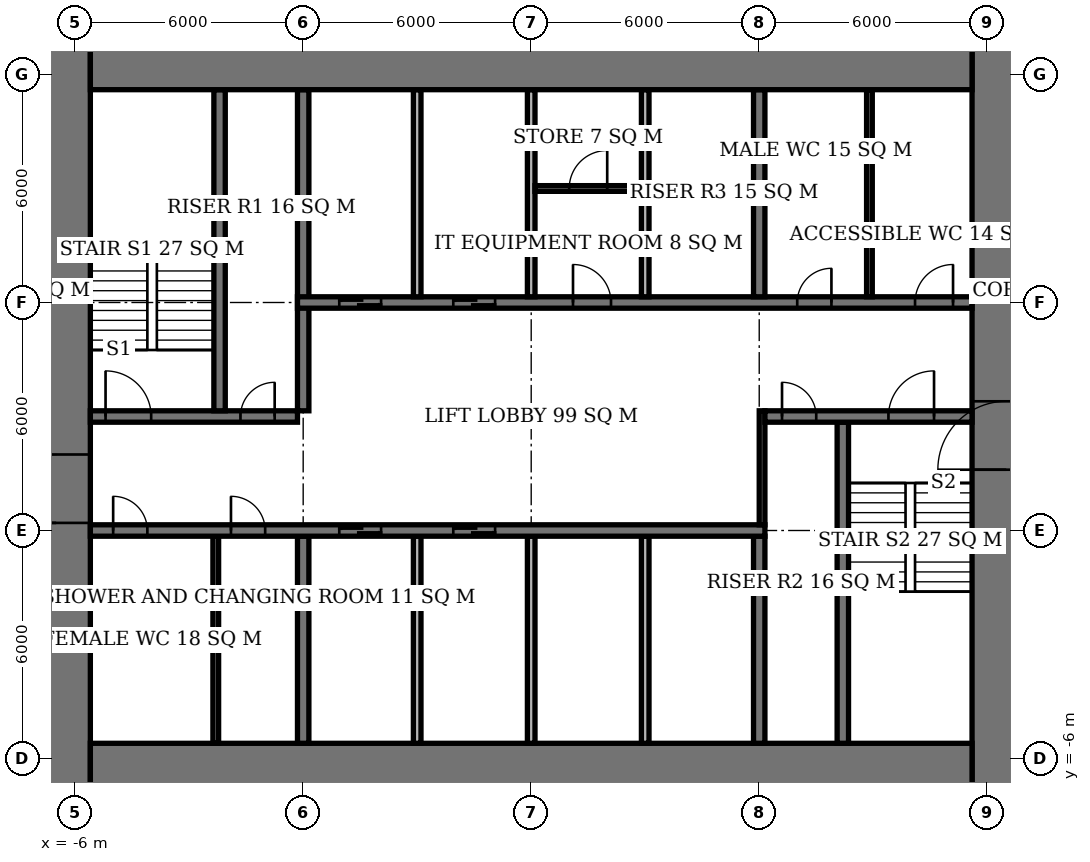
"""IFC4 building model, lengths in metres.
Left out: names, types, materials, properties, quantities, classifications, styles, units other than length and angle.
Written with IfcOpenShell. Run it as: python <this file> out.ifc"""

import sys

from ifc_helpers import new_model, si_unit, direction, frame, frame_2d, origin, place, context, subcontext, project, spatial, rectangle, extrude, element, fill, save


model = new_model("IFC4")
c1 = context("Model", 3, precision=1e-05, world=origin(), true_north=direction((0.0, 1.0)))
c2 = subcontext(c1, "Body", "Model", "MODEL_VIEW")
j1 = project(units=[si_unit("LENGTHUNIT", "METRE"), si_unit("PLANEANGLEUNIT", "RADIAN")], contexts=[c1])
p1 = place(None, origin())
s1 = spatial("IfcSite", under=j1, at=p1, CompositionType="ELEMENT")
p2 = place(p1, origin())
s2 = spatial("IfcBuilding", under=s1, at=p2, CompositionType="ELEMENT")
p3 = place(p2, frame((0.0, 0.0, 152.3)))
s3 = spatial("IfcBuildingStorey", under=s2, at=p3, CompositionType="ELEMENT", Elevation=152.3)
for number, where, z_axis, x_axis in (
    (1, (-5.6, -6.6, 0.0), (0.0, 0.0, 1.0), (1.0, 0.0, 0.0)),
    (2, (-5.6, 12.6, 0.0), (0.0, 0.0, 1.0), (1.0, 0.0, 0.0)),
):
    element("IfcWall", number, at=place(p3, frame(where, z_axis=z_axis, x_axis=x_axis)), inside=s3, PredefinedType="SHEAR", context=c2, shape_type="SweptSolid", body=[
        extrude(rectangle(XDim=23.2, YDim=2.0, at=frame_2d((11.6, 0.0))), origin(), (0.0, 0.0, 1.0), 3.9),
    ])
p4 = place(p3, frame((-6.5, -7.6, 0.0), z_axis=(0.0, 0.0, 1.0), x_axis=(0.0, 1.0, 0.0)))
e3 = element("IfcWall", 3, at=p4, inside=s3, PredefinedType="SHEAR", context=c2, shape_type="SweptSolid", body=[
    extrude(rectangle(XDim=21.2, YDim=1.8, at=frame_2d((10.6, 0.0))), origin(), (0.0, 0.0, 1.0), 3.9),
])
p5 = place(p4, frame((7.8, 0.0, 0.0)))
e4 = element("IfcOpeningElement", 4, at=p5, cuts=e3, PredefinedType="OPENING", context=c2, shape_type="SweptSolid", body=[
    extrude(rectangle(XDim=1.8, YDim=2.4, at=frame_2d((0.9, 1.2))), frame((0.0, 0.91, 0.0), z_axis=(0.0, -1.0, 0.0), x_axis=(1.0, 0.0, 0.0)), (0.0, 0.0, 1.0), 1.82),
])
p6 = place(p3, frame((18.5, -7.6, 0.0), z_axis=(0.0, 0.0, 1.0), x_axis=(0.0, 1.0, 0.0)))
e5 = element("IfcWall", 5, at=p6, inside=s3, PredefinedType="SHEAR", context=c2, shape_type="SweptSolid", body=[
    extrude(rectangle(XDim=21.2, YDim=1.8, at=frame_2d((10.6, 0.0))), origin(), (0.0, 0.0, 1.0), 3.9),
])
p7 = place(p6, frame((9.2, 0.0, 0.0)))
e6 = element("IfcOpeningElement", 6, at=p7, cuts=e5, PredefinedType="OPENING", context=c2, shape_type="SweptSolid", body=[
    extrude(rectangle(XDim=1.8, YDim=2.4, at=frame_2d((0.9, 1.2))), frame((0.0, 0.91, 0.0), z_axis=(0.0, -1.0, 0.0), x_axis=(1.0, 0.0, 0.0)), (0.0, 0.0, 1.0), 1.82),
])
p8 = place(p3, frame((-5.6, 0.0, 0.0), z_axis=(0.0, 0.0, 1.0), x_axis=(1.0, 0.0, 0.0)))
e7 = element("IfcWall", 7, at=p8, inside=s3, PredefinedType="SHEAR", context=c2, shape_type="SweptSolid", body=[
    extrude(rectangle(XDim=17.75, YDim=0.3, at=frame_2d((8.875, 0.0))), origin(), (0.0, 0.0, 1.0), 3.9),
])
p9 = place(p8, frame((0.6, 0.0, 0.0)))
e8 = element("IfcOpeningElement", 8, at=p9, cuts=e7, PredefinedType="OPENING", context=c2, shape_type="SweptSolid", body=[
    extrude(rectangle(XDim=0.9, YDim=2.1, at=frame_2d((0.45, 1.05))), frame((0.0, 0.16, 0.0), z_axis=(0.0, -1.0, 0.0), x_axis=(1.0, 0.0, 0.0)), (0.0, 0.0, 1.0), 0.32),
])
p10 = place(p8, frame((3.7, 0.0, 0.0)))
e9 = element("IfcOpeningElement", 9, at=p10, cuts=e7, PredefinedType="OPENING", context=c2, shape_type="SweptSolid", body=[
    extrude(rectangle(XDim=0.9, YDim=2.1, at=frame_2d((0.45, 1.05))), frame((0.0, 0.16, 0.0), z_axis=(0.0, -1.0, 0.0), x_axis=(1.0, 0.0, 0.0)), (0.0, 0.0, 1.0), 0.32),
])
p11 = place(p8, frame((6.55, 0.0, 0.0)))
e10 = element("IfcOpeningElement", 10, at=p11, cuts=e7, PredefinedType="OPENING", context=c2, shape_type="SweptSolid", body=[
    extrude(rectangle(XDim=1.1, YDim=2.1, at=frame_2d((0.55, 1.05))), frame((0.0, 0.16, 0.0), z_axis=(0.0, -1.0, 0.0), x_axis=(1.0, 0.0, 0.0)), (0.0, 0.0, 1.0), 0.32),
])
p12 = place(p8, frame((9.55, 0.0, 0.0)))
e11 = element("IfcOpeningElement", 11, at=p12, cuts=e7, PredefinedType="OPENING", context=c2, shape_type="SweptSolid", body=[
    extrude(rectangle(XDim=1.1, YDim=2.1, at=frame_2d((0.55, 1.05))), frame((0.0, 0.16, 0.0), z_axis=(0.0, -1.0, 0.0), x_axis=(1.0, 0.0, 0.0)), (0.0, 0.0, 1.0), 0.32),
])
p13 = place(p3, frame((-5.6, 3.0, 0.0), z_axis=(0.0, 0.0, 1.0), x_axis=(1.0, 0.0, 0.0)))
e12 = element("IfcWall", 12, at=p13, inside=s3, PredefinedType="SHEAR", context=c2, shape_type="SweptSolid", body=[
    extrude(rectangle(XDim=5.45, YDim=0.3, at=frame_2d((2.725, 0.0))), origin(), (0.0, 0.0, 1.0), 3.9),
])
p14 = place(p13, frame((0.4, 0.0, 0.0)))
e13 = element("IfcOpeningElement", 13, at=p14, cuts=e12, PredefinedType="OPENING", context=c2, shape_type="SweptSolid", body=[
    extrude(rectangle(XDim=1.2, YDim=2.1, at=frame_2d((0.6, 1.05))), frame((0.0, 0.16, 0.0), z_axis=(0.0, -1.0, 0.0), x_axis=(1.0, 0.0, 0.0)), (0.0, 0.0, 1.0), 0.32),
])
p15 = place(p13, frame((3.95, 0.0, 0.0)))
e14 = element("IfcOpeningElement", 14, at=p15, cuts=e12, PredefinedType="OPENING", context=c2, shape_type="SweptSolid", body=[
    extrude(rectangle(XDim=0.9, YDim=2.1, at=frame_2d((0.45, 1.05))), frame((0.0, 0.16, 0.0), z_axis=(0.0, -1.0, 0.0), x_axis=(1.0, 0.0, 0.0)), (0.0, 0.0, 1.0), 0.32),
])
p16 = place(p3, frame((12.15, 3.0, 0.0), z_axis=(0.0, 0.0, 1.0), x_axis=(1.0, 0.0, 0.0)))
e15 = element("IfcWall", 15, at=p16, inside=s3, PredefinedType="SHEAR", context=c2, shape_type="SweptSolid", body=[
    extrude(rectangle(XDim=5.45, YDim=0.3, at=frame_2d((2.725, 0.0))), origin(), (0.0, 0.0, 1.0), 3.9),
])
p17 = place(p16, frame((3.25, 0.0, 0.0)))
e16 = element("IfcOpeningElement", 16, at=p17, cuts=e15, PredefinedType="OPENING", context=c2, shape_type="SweptSolid", body=[
    extrude(rectangle(XDim=1.2, YDim=2.1, at=frame_2d((0.6, 1.05))), frame((0.0, 0.16, 0.0), z_axis=(0.0, -1.0, 0.0), x_axis=(1.0, 0.0, 0.0)), (0.0, 0.0, 1.0), 0.32),
])
p18 = place(p16, frame((0.45, 0.0, 0.0)))
e17 = element("IfcOpeningElement", 17, at=p18, cuts=e15, PredefinedType="OPENING", context=c2, shape_type="SweptSolid", body=[
    extrude(rectangle(XDim=0.9, YDim=2.1, at=frame_2d((0.45, 1.05))), frame((0.0, 0.16, 0.0), z_axis=(0.0, -1.0, 0.0), x_axis=(1.0, 0.0, 0.0)), (0.0, 0.0, 1.0), 0.32),
])
p19 = place(p3, frame((-0.15, 6.0, 0.0), z_axis=(0.0, 0.0, 1.0), x_axis=(1.0, 0.0, 0.0)))
e18 = element("IfcWall", 18, at=p19, inside=s3, PredefinedType="SHEAR", context=c2, shape_type="SweptSolid", body=[
    extrude(rectangle(XDim=17.75, YDim=0.3, at=frame_2d((8.875, 0.0))), origin(), (0.0, 0.0, 1.0), 3.9),
])
p20 = place(p19, frame((13.15, 0.0, 0.0)))
e19 = element("IfcOpeningElement", 19, at=p20, cuts=e18, PredefinedType="OPENING", context=c2, shape_type="SweptSolid", body=[
    extrude(rectangle(XDim=0.9, YDim=2.1, at=frame_2d((0.45, 1.05))), frame((0.0, 0.16, 0.0), z_axis=(0.0, -1.0, 0.0), x_axis=(1.0, 0.0, 0.0)), (0.0, 0.0, 1.0), 0.32),
])
p21 = place(p19, frame((16.25, 0.0, 0.0)))
e20 = element("IfcOpeningElement", 20, at=p21, cuts=e18, PredefinedType="OPENING", context=c2, shape_type="SweptSolid", body=[
    extrude(rectangle(XDim=1.0, YDim=2.1, at=frame_2d((0.5, 1.05))), frame((0.0, 0.16, 0.0), z_axis=(0.0, -1.0, 0.0), x_axis=(1.0, 0.0, 0.0)), (0.0, 0.0, 1.0), 0.32),
])
p22 = place(p19, frame((7.25, 0.0, 0.0)))
e21 = element("IfcOpeningElement", 21, at=p22, cuts=e18, PredefinedType="OPENING", context=c2, shape_type="SweptSolid", body=[
    extrude(rectangle(XDim=1.0, YDim=2.1, at=frame_2d((0.5, 1.05))), frame((0.0, 0.16, 0.0), z_axis=(0.0, -1.0, 0.0), x_axis=(1.0, 0.0, 0.0)), (0.0, 0.0, 1.0), 0.32),
])
p23 = place(p19, frame((1.1, 0.0, 0.0)))
e22 = element("IfcOpeningElement", 22, at=p23, cuts=e18, PredefinedType="OPENING", context=c2, shape_type="SweptSolid", body=[
    extrude(rectangle(XDim=1.1, YDim=2.1, at=frame_2d((0.55, 1.05))), frame((0.0, 0.16, 0.0), z_axis=(0.0, -1.0, 0.0), x_axis=(1.0, 0.0, 0.0)), (0.0, 0.0, 1.0), 0.32),
])
p24 = place(p19, frame((4.1, 0.0, 0.0)))
e23 = element("IfcOpeningElement", 23, at=p24, cuts=e18, PredefinedType="OPENING", context=c2, shape_type="SweptSolid", body=[
    extrude(rectangle(XDim=1.1, YDim=2.1, at=frame_2d((0.55, 1.05))), frame((0.0, 0.16, 0.0), z_axis=(0.0, -1.0, 0.0), x_axis=(1.0, 0.0, 0.0)), (0.0, 0.0, 1.0), 0.32),
])
p25 = place(p3, frame((0.0, -5.6, 0.0), z_axis=(0.0, 0.0, 1.0), x_axis=(0.0, 1.0, 0.0)))
e24 = element("IfcWall", 24, at=p25, inside=s3, PredefinedType="SHEAR", context=c2, shape_type="SweptSolid", body=[
    extrude(rectangle(XDim=5.45, YDim=0.3, at=frame_2d((2.725, 0.0))), origin(), (0.0, 0.0, 1.0), 3.9),
])
p26 = place(p3, frame((0.0, 3.15, 0.0), z_axis=(0.0, 0.0, 1.0), x_axis=(0.0, 1.0, 0.0)))
e25 = element("IfcWall", 25, at=p26, inside=s3, PredefinedType="SHEAR", context=c2, shape_type="SweptSolid", body=[
    extrude(rectangle(XDim=8.45, YDim=0.3, at=frame_2d((4.225, 0.0))), origin(), (0.0, 0.0, 1.0), 3.9),
])
for number, where, z_axis, x_axis in (
    (26, (12.0, -5.6, 0.0), (0.0, 0.0, 1.0), (0.0, 1.0, 0.0)),
    (27, (12.0, 6.15, 0.0), (0.0, 0.0, 1.0), (0.0, 1.0, 0.0)),
):
    element("IfcWall", number, at=place(p3, frame(where, z_axis=z_axis, x_axis=x_axis)), inside=s3, PredefinedType="SHEAR", context=c2, shape_type="SweptSolid", body=[
        extrude(rectangle(XDim=5.45, YDim=0.3, at=frame_2d((2.725, 0.0))), origin(), (0.0, 0.0, 1.0), 3.9),
    ])
for number, where, z_axis, x_axis in (
    (28, (-2.2, 3.15, 0.0), (0.0, 0.0, 1.0), (0.0, 1.0, 0.0)),
    (29, (14.2, -5.6, 0.0), (0.0, 0.0, 1.0), (0.0, 1.0, 0.0)),
):
    element("IfcWall", number, at=place(p3, frame(where, z_axis=z_axis, x_axis=x_axis)), inside=s3, PredefinedType="SHEAR", context=c2, shape_type="SweptSolid", body=[
        extrude(rectangle(XDim=8.45, YDim=0.3, at=frame_2d((4.225, 0.0))), origin(), (0.0, 0.0, 1.0), 3.9),
    ])
for number, where, z_axis, x_axis in (
    (30, (3.0, 6.15, 0.0), (0.0, 0.0, 1.0), (0.0, 1.0, 0.0)),
    (31, (6.0, 6.15, 0.0), (0.0, 0.0, 1.0), (0.0, 1.0, 0.0)),
    (32, (9.0, 6.15, 0.0), (0.0, 0.0, 1.0), (0.0, 1.0, 0.0)),
    (33, (3.0, -5.6, 0.0), (0.0, 0.0, 1.0), (0.0, 1.0, 0.0)),
    (34, (6.0, -5.6, 0.0), (0.0, 0.0, 1.0), (0.0, 1.0, 0.0)),
    (35, (9.0, -5.6, 0.0), (0.0, 0.0, 1.0), (0.0, 1.0, 0.0)),
):
    element("IfcWall", number, at=place(p3, frame(where, z_axis=z_axis, x_axis=x_axis)), inside=s3, PredefinedType="SOLIDWALL", context=c2, shape_type="SweptSolid", body=[
        extrude(rectangle(XDim=5.45, YDim=0.2, at=frame_2d((2.725, 0.0))), origin(), (0.0, 0.0, 1.0), 3.9),
    ])
for number, where, z_axis, x_axis in (
    (36, (-2.3, -5.6, 0.0), (0.0, 0.0, 1.0), (0.0, 1.0, 0.0)),
    (37, (14.9, 6.15, 0.0), (0.0, 0.0, 1.0), (0.0, 1.0, 0.0)),
):
    element("IfcWall", number, at=place(p3, frame(where, z_axis=z_axis, x_axis=x_axis)), inside=s3, PredefinedType="PLUMBINGWALL", context=c2, shape_type="SweptSolid", body=[
        extrude(rectangle(XDim=5.45, YDim=0.15, at=frame_2d((2.725, 0.0))), origin(), (0.0, 0.0, 1.0), 3.65),
    ])
p27 = place(p3, frame((6.1, 9.0, 0.0), z_axis=(0.0, 0.0, 1.0), x_axis=(1.0, 0.0, 0.0)))
e38 = element("IfcWall", 38, at=p27, inside=s3, PredefinedType="PARTITIONING", context=c2, shape_type="SweptSolid", body=[
    extrude(rectangle(XDim=2.8, YDim=0.15, at=frame_2d((1.4, 0.0))), origin(), (0.0, 0.0, 1.0), 3.65),
])
p28 = place(p27, frame((0.9, 0.0, 0.0)))
e39 = element("IfcOpeningElement", 39, at=p28, cuts=e38, PredefinedType="OPENING", context=c2, shape_type="SweptSolid", body=[
    extrude(rectangle(XDim=1.0, YDim=2.1, at=frame_2d((0.5, 1.05))), frame((0.0, 0.085, 0.0), z_axis=(0.0, -1.0, 0.0), x_axis=(1.0, 0.0, 0.0)), (0.0, 0.0, 1.0), 0.17),
])
p29 = place(p3, frame((12.075, 0.15, 0.0), z_axis=(0.0, 0.0, 1.0), x_axis=(0.0, 1.0, 0.0)))
e40 = element("IfcWall", 40, at=p29, inside=s3, PredefinedType="PARTITIONING", context=c2, shape_type="SweptSolid", body=[
    extrude(rectangle(XDim=3.0, YDim=0.15, at=frame_2d((1.5, 0.0))), origin(), (0.0, 0.0, 1.0), 3.65),
])
p30 = place(p5, origin())
e41 = element("IfcDoor", 41, at=p30, inside=s3, OperationType="DOUBLE_DOOR_SINGLE_SWING", PredefinedType="DOOR", context=c2, shape_type="SweptSolid", body=[
    extrude(rectangle(XDim=1.8, YDim=2.4, at=frame_2d((0.9, 1.2))), frame((0.0, 0.025, 0.0), z_axis=(0.0, -1.0, 0.0), x_axis=(1.0, 0.0, 0.0)), (0.0, 0.0, 1.0), 0.05),
])
fill(e4, e41)
p31 = place(p7, origin())
e42 = element("IfcDoor", 42, at=p31, inside=s3, OperationType="DOUBLE_DOOR_SINGLE_SWING", PredefinedType="DOOR", context=c2, shape_type="SweptSolid", body=[
    extrude(rectangle(XDim=1.8, YDim=2.4, at=frame_2d((0.9, 1.2))), frame((0.0, 0.025, 0.0), z_axis=(0.0, -1.0, 0.0), x_axis=(1.0, 0.0, 0.0)), (0.0, 0.0, 1.0), 0.05),
])
fill(e6, e42)
p32 = place(p14, origin())
e43 = element("IfcDoor", 43, at=p32, inside=s3, OperationType="SINGLE_SWING_LEFT", PredefinedType="DOOR", context=c2, shape_type="SweptSolid", body=[
    extrude(rectangle(XDim=1.2, YDim=2.1, at=frame_2d((0.6, 1.05))), frame((0.0, 0.025, 0.0), z_axis=(0.0, -1.0, 0.0), x_axis=(1.0, 0.0, 0.0)), (0.0, 0.0, 1.0), 0.05),
])
fill(e13, e43)
p33 = place(p15, origin())
e44 = element("IfcDoor", 44, at=p33, inside=s3, OperationType="SINGLE_SWING_RIGHT", PredefinedType="DOOR", context=c2, shape_type="SweptSolid", body=[
    extrude(rectangle(XDim=0.9, YDim=2.1, at=frame_2d((0.45, 1.05))), frame((0.0, 0.025, 0.0), z_axis=(0.0, -1.0, 0.0), x_axis=(1.0, 0.0, 0.0)), (0.0, 0.0, 1.0), 0.05),
])
fill(e14, e44)
p34 = place(p17, origin())
e45 = element("IfcDoor", 45, at=p34, inside=s3, OperationType="SINGLE_SWING_RIGHT", PredefinedType="DOOR", context=c2, shape_type="SweptSolid", body=[
    extrude(rectangle(XDim=1.2, YDim=2.1, at=frame_2d((0.6, 1.05))), frame((0.0, 0.025, 0.0), z_axis=(0.0, -1.0, 0.0), x_axis=(1.0, 0.0, 0.0)), (0.0, 0.0, 1.0), 0.05),
])
fill(e16, e45)
p35 = place(p18, origin())
e46 = element("IfcDoor", 46, at=p35, inside=s3, OperationType="SINGLE_SWING_LEFT", PredefinedType="DOOR", context=c2, shape_type="SweptSolid", body=[
    extrude(rectangle(XDim=0.9, YDim=2.1, at=frame_2d((0.45, 1.05))), frame((0.0, 0.025, 0.0), z_axis=(0.0, -1.0, 0.0), x_axis=(1.0, 0.0, 0.0)), (0.0, 0.0, 1.0), 0.05),
])
fill(e17, e46)
p36 = place(p9, origin())
e47 = element("IfcDoor", 47, at=p36, inside=s3, OperationType="SINGLE_SWING_LEFT", PredefinedType="DOOR", context=c2, shape_type="SweptSolid", body=[
    extrude(rectangle(XDim=0.9, YDim=2.1, at=frame_2d((0.45, 1.05))), frame((0.0, 0.025, 0.0), z_axis=(0.0, -1.0, 0.0), x_axis=(1.0, 0.0, 0.0)), (0.0, 0.0, 1.0), 0.05),
])
fill(e8, e47)
p37 = place(p10, origin())
e48 = element("IfcDoor", 48, at=p37, inside=s3, OperationType="SINGLE_SWING_LEFT", PredefinedType="DOOR", context=c2, shape_type="SweptSolid", body=[
    extrude(rectangle(XDim=0.9, YDim=2.1, at=frame_2d((0.45, 1.05))), frame((0.0, 0.025, 0.0), z_axis=(0.0, -1.0, 0.0), x_axis=(1.0, 0.0, 0.0)), (0.0, 0.0, 1.0), 0.05),
])
fill(e9, e48)
p38 = place(p20, origin())
e49 = element("IfcDoor", 49, at=p38, inside=s3, OperationType="SINGLE_SWING_RIGHT", PredefinedType="DOOR", context=c2, shape_type="SweptSolid", body=[
    extrude(rectangle(XDim=0.9, YDim=2.1, at=frame_2d((0.45, 1.05))), frame((0.0, 0.025, 0.0), z_axis=(0.0, -1.0, 0.0), x_axis=(1.0, 0.0, 0.0)), (0.0, 0.0, 1.0), 0.05),
])
fill(e19, e49)
p39 = place(p21, origin())
e50 = element("IfcDoor", 50, at=p39, inside=s3, OperationType="SINGLE_SWING_RIGHT", PredefinedType="DOOR", context=c2, shape_type="SweptSolid", body=[
    extrude(rectangle(XDim=1.0, YDim=2.1, at=frame_2d((0.5, 1.05))), frame((0.0, 0.025, 0.0), z_axis=(0.0, -1.0, 0.0), x_axis=(1.0, 0.0, 0.0)), (0.0, 0.0, 1.0), 0.05),
])
fill(e20, e50)
p40 = place(p28, origin())
e51 = element("IfcDoor", 51, at=p40, inside=s3, OperationType="SINGLE_SWING_RIGHT", PredefinedType="DOOR", context=c2, shape_type="SweptSolid", body=[
    extrude(rectangle(XDim=1.0, YDim=2.1, at=frame_2d((0.5, 1.05))), frame((0.0, 0.025, 0.0), z_axis=(0.0, -1.0, 0.0), x_axis=(1.0, 0.0, 0.0)), (0.0, 0.0, 1.0), 0.05),
])
fill(e39, e51)
p41 = place(p22, origin())
e52 = element("IfcDoor", 52, at=p41, inside=s3, OperationType="SINGLE_SWING_LEFT", PredefinedType="DOOR", context=c2, shape_type="SweptSolid", body=[
    extrude(rectangle(XDim=1.0, YDim=2.1, at=frame_2d((0.5, 1.05))), frame((0.0, 0.025, 0.0), z_axis=(0.0, -1.0, 0.0), x_axis=(1.0, 0.0, 0.0)), (0.0, 0.0, 1.0), 0.05),
])
fill(e21, e52)
p42 = place(p23, origin())
e53 = element("IfcDoor", 53, at=p42, inside=s3, OperationType="DOUBLE_DOOR_SLIDING", PredefinedType="USERDEFINED", context=c2, shape_type="SweptSolid", body=[
    extrude(rectangle(XDim=1.1, YDim=2.1, at=frame_2d((0.55, 1.05))), frame((0.0, 0.025, 0.0), z_axis=(0.0, -1.0, 0.0), x_axis=(1.0, 0.0, 0.0)), (0.0, 0.0, 1.0), 0.05),
])
fill(e22, e53)
p43 = place(p24, origin())
e54 = element("IfcDoor", 54, at=p43, inside=s3, OperationType="DOUBLE_DOOR_SLIDING", PredefinedType="USERDEFINED", context=c2, shape_type="SweptSolid", body=[
    extrude(rectangle(XDim=1.1, YDim=2.1, at=frame_2d((0.55, 1.05))), frame((0.0, 0.025, 0.0), z_axis=(0.0, -1.0, 0.0), x_axis=(1.0, 0.0, 0.0)), (0.0, 0.0, 1.0), 0.05),
])
fill(e23, e54)
p44 = place(p11, origin())
e55 = element("IfcDoor", 55, at=p44, inside=s3, OperationType="DOUBLE_DOOR_SLIDING", PredefinedType="USERDEFINED", context=c2, shape_type="SweptSolid", body=[
    extrude(rectangle(XDim=1.1, YDim=2.1, at=frame_2d((0.55, 1.05))), frame((0.0, 0.025, 0.0), z_axis=(0.0, -1.0, 0.0), x_axis=(1.0, 0.0, 0.0)), (0.0, 0.0, 1.0), 0.05),
])
fill(e10, e55)
p45 = place(p12, origin())
e56 = element("IfcDoor", 56, at=p45, inside=s3, OperationType="DOUBLE_DOOR_SLIDING", PredefinedType="USERDEFINED", context=c2, shape_type="SweptSolid", body=[
    extrude(rectangle(XDim=1.1, YDim=2.1, at=frame_2d((0.55, 1.05))), frame((0.0, 0.025, 0.0), z_axis=(0.0, -1.0, 0.0), x_axis=(1.0, 0.0, 0.0)), (0.0, 0.0, 1.0), 0.05),
])
fill(e11, e56)
save(model, sys.argv[1])
